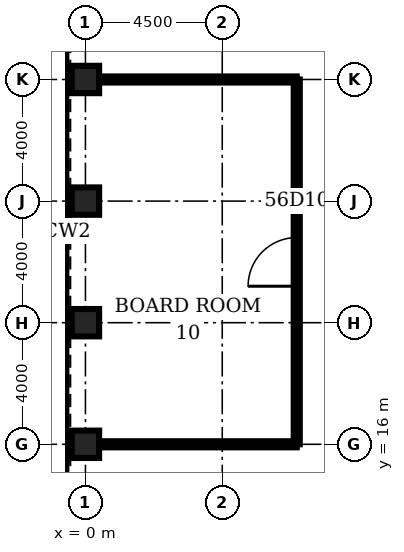
"""IFC4 building model, lengths in metres.
Left out: names, types, materials, properties, quantities, classifications, styles, units other than length and angle.
Written with IfcOpenShell. Run it as: python <this file> out.ifc"""

import sys

from ifc_helpers import new_model, si_unit, direction, frame, frame_2d, origin, origin_2d, place, context, subcontext, project, spatial, rectangle, hollow_rectangle, extrude, element, fill, save


model = new_model("IFC4")
c1 = context("Model", 3, precision=1e-05, world=origin(), true_north=direction((0.0, 1.0)))
c2 = subcontext(c1, "Body", "Model", "MODEL_VIEW")
j1 = project(units=[si_unit("LENGTHUNIT", "METRE"), si_unit("PLANEANGLEUNIT", "RADIAN")], contexts=[c1])
p1 = place(None, origin())
s1 = spatial("IfcSite", under=j1, at=p1, CompositionType="ELEMENT")
p2 = place(p1, origin())
s2 = spatial("IfcBuilding", under=s1, at=p2, CompositionType="ELEMENT")
p3 = place(p2, frame((0.0, 0.0, 248.8)))
s3 = spatial("IfcBuildingStorey", under=s2, at=p3, CompositionType="ELEMENT", Elevation=248.8)
for number, where, z_axis, x_axis in (
    (1, (0.0, 28.0, 0.0), (0.0, 0.0, 1.0), (1.0, 0.0, 0.0)),
    (2, (0.0, 24.0, 0.0), (0.0, 0.0, 1.0), (1.0, 0.0, 0.0)),
    (3, (0.0, 20.0, 0.0), (0.0, 0.0, 1.0), (1.0, 0.0, 0.0)),
    (4, (0.0, 16.0, 0.0), (0.0, 0.0, 1.0), (1.0, 0.0, 0.0)),
):
    element("IfcColumn", number, at=place(p3, frame(where, z_axis=z_axis, x_axis=x_axis)), inside=s3, PredefinedType="COLUMN", context=c2, shape_type="SweptSolid", body=[
        extrude(hollow_rectangle(XDim=0.9, YDim=0.9, WallThickness=0.07, at=origin_2d()), origin(), (0.0, 0.0, 1.0), 4.2),
    ])
for number, where, z_axis, x_axis in (
    (5, (0.45, 16.0, 0.0), (0.0, 0.0, 1.0), (1.0, 0.0, 0.0)),
    (6, (0.45, 28.0, 0.0), (0.0, 0.0, 1.0), (1.0, 0.0, 0.0)),
):
    element("IfcWall", number, at=place(p3, frame(where, z_axis=z_axis, x_axis=x_axis)), inside=s3, PredefinedType="PARTITIONING", context=c2, shape_type="SweptSolid", body=[
        extrude(rectangle(XDim=6.5, YDim=0.2, at=frame_2d((3.25, 0.0))), origin(), (0.0, 0.0, 1.0), 3.0),
    ])
p4 = place(p3, frame((6.95, 16.0, 0.0), z_axis=(0.0, 0.0, 1.0), x_axis=(0.0, 1.0, 0.0)))
e7 = element("IfcWall", 7, at=p4, inside=s3, PredefinedType="PARTITIONING", context=c2, shape_type="SweptSolid", body=[
    extrude(rectangle(XDim=12.0, YDim=0.2, at=frame_2d((6.0, 0.0))), origin(), (0.0, 0.0, 1.0), 3.0),
])
p5 = place(p4, frame((5.2, 0.0, 0.0)))
e8 = element("IfcOpeningElement", 8, at=p5, cuts=e7, PredefinedType="OPENING", context=c2, shape_type="SweptSolid", body=[
    extrude(rectangle(XDim=1.6, YDim=2.1, at=frame_2d((0.8, 1.05))), frame((0.0, 0.11, 0.0), z_axis=(0.0, -1.0, 0.0), x_axis=(1.0, 0.0, 0.0)), (0.0, 0.0, 1.0), 0.22),
])
p6 = place(p5, origin())
e9 = element("IfcDoor", 9, at=p6, inside=s3, OperationType="SINGLE_SWING_LEFT", PredefinedType="DOOR", context=c2, shape_type="SweptSolid", body=[
    extrude(rectangle(XDim=1.6, YDim=2.1, at=frame_2d((0.8, 1.05))), frame((0.0, 0.025, 0.0), z_axis=(0.0, -1.0, 0.0), x_axis=(1.0, 0.0, 0.0)), (0.0, 0.0, 1.0), 0.05),
])
fill(e8, e9)
save(model, sys.argv[1])
